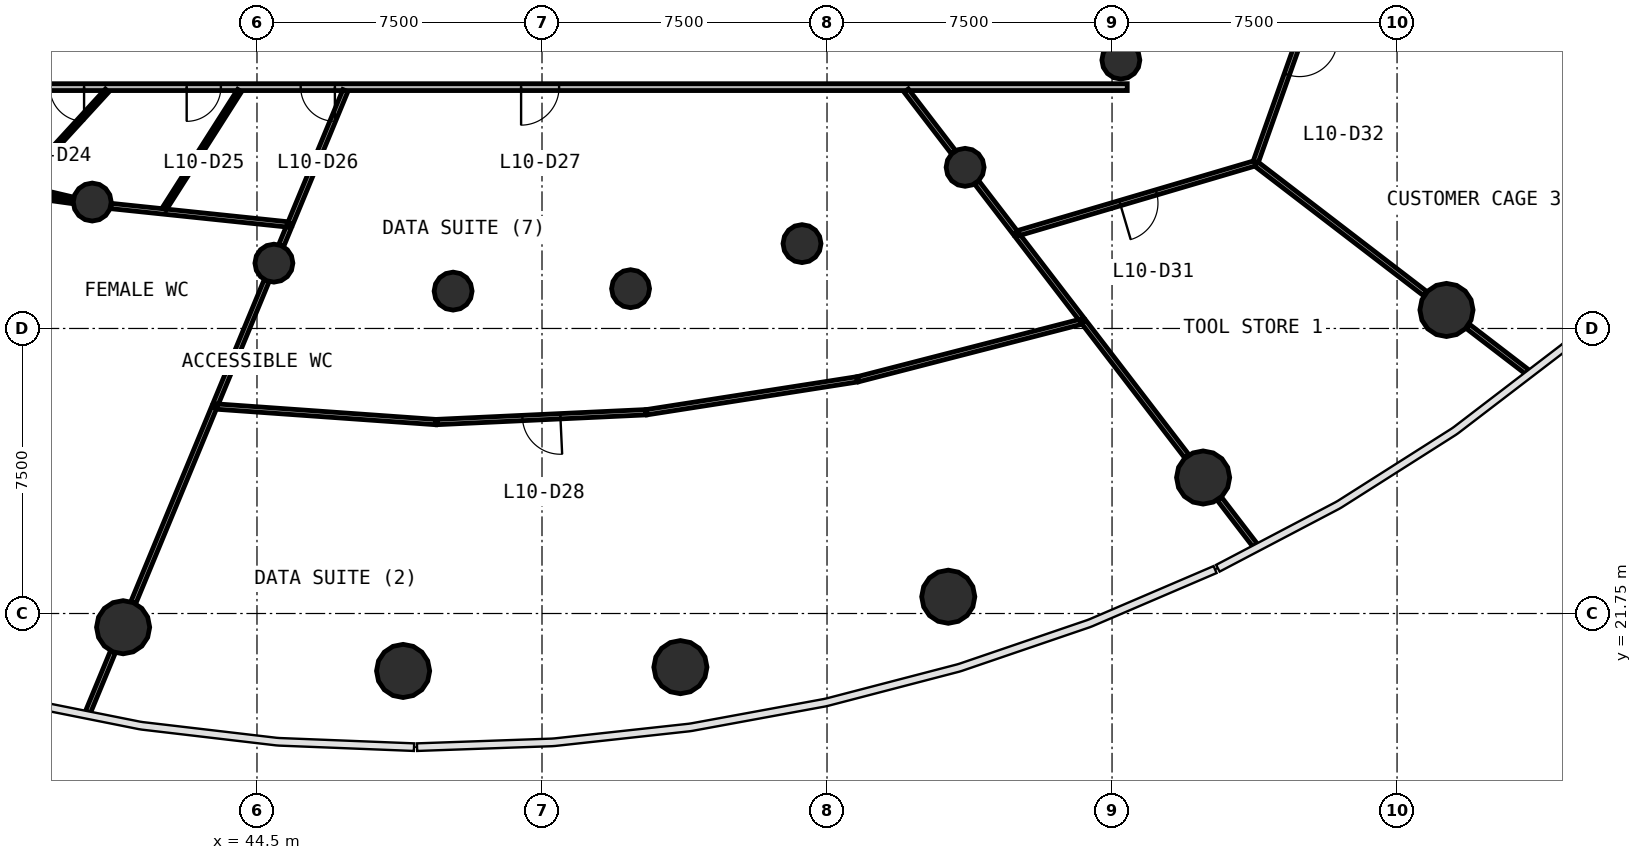
"""IFC4 building model, lengths in metres.
Left out: names, types, materials, properties, quantities, classifications, styles, units other than length and angle.
Written with IfcOpenShell. Run it as: python <this file> out.ifc"""

import sys

from ifc_helpers import new_model, si_unit, direction, frame, frame_2d, origin, origin_2d, place, context, subcontext, project, spatial, rectangle, circle, extrude, source, transform, mapped, element, fill, save


model = new_model("IFC4")
c1 = context("Model", 3, precision=1e-05, world=origin(), true_north=direction((0.0, 1.0)))
c2 = subcontext(c1, "Body", "Model", "MODEL_VIEW")
j1 = project(units=[si_unit("LENGTHUNIT", "METRE"), si_unit("PLANEANGLEUNIT", "RADIAN")], contexts=[c1])
p1 = place(None, origin())
s1 = spatial("IfcSite", under=j1, at=p1, CompositionType="ELEMENT")
p2 = place(p1, origin())
s2 = spatial("IfcBuilding", under=s1, at=p2, CompositionType="ELEMENT")
p3 = place(p2, frame((0.0, 0.0, 44.6)))
s3 = spatial("IfcBuildingStorey", under=s2, at=p3, CompositionType="ELEMENT", Elevation=44.6)
m1 = source(origin(), c2, "Body", "SweptSolid", [
    extrude(circle(Radius=0.7, at=origin_2d()), origin(), (0.0, 0.0, 1.0), 4.4),
])
for number, where, z_axis, x_axis in (
    (1, (40.977, 21.389, 0.0), (0.0, 0.0, 1.0), (1.0, 0.0, 0.0)),
    (2, (48.345, 20.239, 0.0), (0.0, 0.0, 1.0), (1.0, 0.0, 0.0)),
    (3, (55.642, 20.339, 0.0), (0.0, 0.0, 1.0), (1.0, 0.0, 0.0)),
    (4, (62.69, 22.191, 0.0), (0.0, 0.0, 1.0), (1.0, 0.0, 0.0)),
    (5, (69.396, 25.328, 0.0), (0.0, 0.0, 1.0), (1.0, 0.0, 0.0)),
    (6, (75.801, 29.737, 0.0), (0.0, 0.0, 1.0), (1.0, 0.0, 0.0)),
):
    element("IfcColumn", number, at=place(p3, frame(where, z_axis=z_axis, x_axis=x_axis)), inside=s3, PredefinedType="COLUMN", context=c2, shape_type="MappedRepresentation", body=[
        mapped(m1, transform((0.0, 0.0, 0.0), scale=1.0)),
    ])
m2 = source(origin(), c2, "Body", "SweptSolid", [
    extrude(circle(Radius=0.5, at=origin_2d()), origin(), (0.0, 0.0, 1.0), 4.4),
])
for number, where, z_axis, x_axis in (
    (7, (40.165, 32.576, 0.0), (0.0, 0.0, 1.0), (1.0, 0.0, 0.0)),
    (8, (44.945, 30.969, 0.0), (0.0, 0.0, 1.0), (1.0, 0.0, 0.0)),
    (9, (49.661, 30.233, 0.0), (0.0, 0.0, 1.0), (1.0, 0.0, 0.0)),
    (10, (54.331, 30.297, 0.0), (0.0, 0.0, 1.0), (1.0, 0.0, 0.0)),
    (11, (58.842, 31.482, 0.0), (0.0, 0.0, 1.0), (1.0, 0.0, 0.0)),
    (12, (63.134, 33.49, 0.0), (0.0, 0.0, 1.0), (1.0, 0.0, 0.0)),
    (13, (67.232, 36.312, 0.0), (0.0, 0.0, 1.0), (1.0, 0.0, 0.0)),
):
    element("IfcColumn", number, at=place(p3, frame(where, z_axis=z_axis, x_axis=x_axis)), inside=s3, PredefinedType="COLUMN", context=c2, shape_type="MappedRepresentation", body=[
        mapped(m2, transform((0.0, 0.0, 0.0), scale=1.0)),
    ])
p4 = place(p3, frame((67.4, 35.6, 0.0), z_axis=(0.0, 0.0, 1.0), x_axis=(-1.0, 0.0, 0.0)))
e14 = element("IfcWall", 14, at=p4, inside=s3, PredefinedType="PARTITIONING", context=c2, shape_type="SweptSolid", body=[
    extrude(rectangle(XDim=30.8, YDim=0.18, at=frame_2d((15.4, 0.0))), origin(), (0.0, 0.0, 1.0), 3.05),
])
p5 = place(p4, frame((27.45, 0.0, 0.0)))
e15 = element("IfcOpeningElement", 15, at=p5, cuts=e14, PredefinedType="OPENING", context=c2, shape_type="SweptSolid", body=[
    extrude(rectangle(XDim=0.9, YDim=2.1, at=frame_2d((0.45, 1.05))), frame((0.0, 0.1, 0.0), z_axis=(0.0, -1.0, 0.0), x_axis=(1.0, 0.0, 0.0)), (0.0, 0.0, 1.0), 0.2),
])
p6 = place(p4, frame((23.85, 0.0, 0.0)))
e16 = element("IfcOpeningElement", 16, at=p6, cuts=e14, PredefinedType="OPENING", context=c2, shape_type="SweptSolid", body=[
    extrude(rectangle(XDim=0.9, YDim=2.1, at=frame_2d((0.45, 1.05))), frame((0.0, 0.1, 0.0), z_axis=(0.0, -1.0, 0.0), x_axis=(1.0, 0.0, 0.0)), (0.0, 0.0, 1.0), 0.2),
])
p7 = place(p4, frame((20.85, 0.0, 0.0)))
e17 = element("IfcOpeningElement", 17, at=p7, cuts=e14, PredefinedType="OPENING", context=c2, shape_type="SweptSolid", body=[
    extrude(rectangle(XDim=0.9, YDim=2.1, at=frame_2d((0.45, 1.05))), frame((0.0, 0.1, 0.0), z_axis=(0.0, -1.0, 0.0), x_axis=(1.0, 0.0, 0.0)), (0.0, 0.0, 1.0), 0.2),
])
p8 = place(p4, frame((14.95, 0.0, 0.0)))
e18 = element("IfcOpeningElement", 18, at=p8, cuts=e14, PredefinedType="OPENING", context=c2, shape_type="SweptSolid", body=[
    extrude(rectangle(XDim=1.0, YDim=2.1, at=frame_2d((0.5, 1.05))), frame((0.0, 0.1, 0.0), z_axis=(0.0, -1.0, 0.0), x_axis=(1.0, 0.0, 0.0)), (0.0, 0.0, 1.0), 0.2),
])
p9 = place(p3, frame((72.821, 39.375, 0.0), z_axis=(0.0, 0.0, 1.0), x_axis=(0.923875203153, -0.382693884193, 0.0)))
e19 = element("IfcWall", 19, at=p9, inside=s3, PredefinedType="PARTITIONING", context=c2, shape_type="SweptSolid", body=[
    extrude(rectangle(XDim=8.845, YDim=0.14, at=frame_2d((4.423, 0.0))), origin(), (0.0, 0.0, 1.0), 3.05),
])
p10 = place(p3, frame((70.769, 33.598, 0.0), z_axis=(0.0, 0.0, 1.0), x_axis=(-0.959164410747, -0.282849134974, 0.0)))
e20 = element("IfcWall", 20, at=p10, inside=s3, PredefinedType="PARTITIONING", context=c2, shape_type="SweptSolid", body=[
    extrude(rectangle(XDim=6.562, YDim=0.14, at=frame_2d((3.281, 0.0))), origin(), (0.0, 0.0, 1.0), 3.05),
])
p11 = place(p10, frame((2.712, 0.0, 0.0)))
e21 = element("IfcOpeningElement", 21, at=p11, cuts=e20, PredefinedType="OPENING", context=c2, shape_type="SweptSolid", body=[
    extrude(rectangle(XDim=1.0, YDim=2.1, at=frame_2d((0.5, 1.05))), frame((0.0, 0.08, 0.0), z_axis=(0.0, -1.0, 0.0), x_axis=(1.0, 0.0, 0.0)), (0.0, 0.0, 1.0), 0.16),
])
p12 = place(p3, frame((72.798, 39.309, 0.0), z_axis=(0.0, 0.0, 1.0), x_axis=(-0.334820387554, -0.942281968456, 0.0)))
e22 = element("IfcWall", 22, at=p12, inside=s3, PredefinedType="PARTITIONING", context=c2, shape_type="SweptSolid", body=[
    extrude(rectangle(XDim=6.031, YDim=0.14, at=frame_2d((3.016, 0.0))), origin(), (0.0, 0.0, 1.0), 3.05),
])
p13 = place(p12, frame((2.581, 0.0, 0.0)))
e23 = element("IfcOpeningElement", 23, at=p13, cuts=e22, PredefinedType="OPENING", context=c2, shape_type="SweptSolid", body=[
    extrude(rectangle(XDim=1.0, YDim=2.1, at=frame_2d((0.5, 1.05))), frame((0.0, 0.08, 0.0), z_axis=(0.0, -1.0, 0.0), x_axis=(1.0, 0.0, 0.0)), (0.0, 0.0, 1.0), 0.16),
])
p14 = place(p3, frame((60.319, 27.916, 0.0), z_axis=(0.0, 0.0, 1.0), x_axis=(0.968340865999, 0.24963166313, 0.0)))
e24 = element("IfcWall", 24, at=p14, inside=s3, PredefinedType="PARTITIONING", context=c2, shape_type="SweptSolid", body=[
    extrude(rectangle(XDim=6.115, YDim=0.14, at=frame_2d((3.057, 0.0))), origin(), (0.0, 0.0, 1.0), 3.05),
])
p15 = place(p3, frame((33.805, 34.009, 0.0), z_axis=(0.0, 0.0, 1.0), x_axis=(0.973632222489, -0.22812342127, 0.0)))
e25 = element("IfcWall", 25, at=p15, inside=s3, PredefinedType="PARTITIONING", context=c2, shape_type="SweptSolid", body=[
    extrude(rectangle(XDim=6.018, YDim=0.14, at=frame_2d((3.009, 0.0))), origin(), (0.0, 0.0, 1.0), 3.05),
])
p16 = place(p3, frame((43.384, 27.199, 0.0), z_axis=(0.0, 0.0, 1.0), x_axis=(0.997508340925, -0.070548634182, 0.0)))
e26 = element("IfcWall", 26, at=p16, inside=s3, PredefinedType="PARTITIONING", context=c2, shape_type="SweptSolid", body=[
    extrude(rectangle(XDim=5.838, YDim=0.14, at=frame_2d((2.919, 0.0))), origin(), (0.0, 0.0, 1.0), 3.05),
])
p17 = place(p3, frame((70.793, 33.58, 0.0), z_axis=(0.0, 0.0, 1.0), x_axis=(0.793369467151, -0.6087404115, 0.0)))
e27 = element("IfcWall", 27, at=p17, inside=s3, PredefinedType="PARTITIONING", context=c2, shape_type="SweptSolid", body=[
    extrude(rectangle(XDim=5.608, YDim=0.14, at=frame_2d((2.804, 0.0))), origin(), (0.0, 0.0, 1.0), 3.05),
])
p18 = place(p3, frame((54.759, 27.047, 0.0), z_axis=(0.0, 0.0, 1.0), x_axis=(0.98802429514, 0.154298386943, 0.0)))
e28 = element("IfcWall", 28, at=p18, inside=s3, PredefinedType="PARTITIONING", context=c2, shape_type="SweptSolid", body=[
    extrude(rectangle(XDim=5.598, YDim=0.14, at=frame_2d((2.799, 0.0))), origin(), (0.0, 0.0, 1.0), 3.05),
])
p19 = place(p3, frame((43.373, 27.171, 0.0), z_axis=(0.0, 0.0, 1.0), x_axis=(-0.382670118501, -0.923885047182, 0.0)))
e29 = element("IfcWall", 29, at=p19, inside=s3, PredefinedType="PARTITIONING", context=c2, shape_type="SweptSolid", body=[
    extrude(rectangle(XDim=5.554, YDim=0.14, at=frame_2d((2.777, 0.0))), origin(), (0.0, 0.0, 1.0), 3.05),
])
p20 = place(p3, frame((54.729, 27.046, 0.0), z_axis=(0.0, 0.0, 1.0), x_axis=(-0.998905899041, -0.046765423781, 0.0)))
e30 = element("IfcWall", 30, at=p20, inside=s3, PredefinedType="PARTITIONING", context=c2, shape_type="SweptSolid", body=[
    extrude(rectangle(XDim=5.497, YDim=0.14, at=frame_2d((2.749, 0.0))), origin(), (0.0, 0.0, 1.0), 3.05),
])
p21 = place(p20, frame((2.247, 0.0, 0.0)))
e31 = element("IfcOpeningElement", 31, at=p21, cuts=e30, PredefinedType="OPENING", context=c2, shape_type="SweptSolid", body=[
    extrude(rectangle(XDim=1.0, YDim=2.1, at=frame_2d((0.5, 1.05))), frame((0.0, 0.08, 0.0), z_axis=(0.0, -1.0, 0.0), x_axis=(1.0, 0.0, 0.0)), (0.0, 0.0, 1.0), 0.16),
])
p22 = place(p3, frame((40.659, 32.472, 0.0), z_axis=(0.0, 0.0, 1.0), x_axis=(0.994613201527, -0.103656062762, 0.0)))
e32 = element("IfcWall", 32, at=p22, inside=s3, PredefinedType="PARTITIONING", context=c2, shape_type="SweptSolid", body=[
    extrude(rectangle(XDim=4.732, YDim=0.14, at=frame_2d((2.366, 0.0))), origin(), (0.0, 0.0, 1.0), 3.05),
])
p23 = place(p3, frame((66.258, 29.418, 0.0), z_axis=(0.0, 0.0, 1.0), x_axis=(0.608774632027, -0.793343209085, 0.0)))
e33 = element("IfcWall", 33, at=p23, inside=s3, PredefinedType="PARTITIONING", context=c2, shape_type="SweptSolid", body=[
    extrude(rectangle(XDim=4.451, YDim=0.14, at=frame_2d((2.226, 0.0))), origin(), (0.0, 0.0, 1.0), 3.05),
])
p24 = place(p3, frame((46.826, 35.51, 0.0), z_axis=(0.0, 0.0, 1.0), x_axis=(-0.382683759209, -0.923879397128, 0.0)))
e34 = element("IfcWall", 34, at=p24, inside=s3, PredefinedType="PARTITIONING", context=c2, shape_type="SweptSolid", body=[
    extrude(rectangle(XDim=3.789, YDim=0.14, at=frame_2d((1.895, 0.0))), origin(), (0.0, 0.0, 1.0), 3.05),
])
p25 = place(p3, frame((44.752, 30.502, 0.0), z_axis=(0.0, 0.0, 1.0), x_axis=(-0.382698672088, -0.923873219864, 0.0)))
e35 = element("IfcWall", 35, at=p25, inside=s3, PredefinedType="PARTITIONING", context=c2, shape_type="SweptSolid", body=[
    extrude(rectangle(XDim=3.502, YDim=0.14, at=frame_2d((1.751, 0.0))), origin(), (0.0, 0.0, 1.0), 3.05),
])
p26 = place(p3, frame((64.521, 31.683, 0.0), z_axis=(0.0, 0.0, 1.0), x_axis=(0.608761578312, -0.793353225727, 0.0)))
e36 = element("IfcWall", 36, at=p26, inside=s3, PredefinedType="PARTITIONING", context=c2, shape_type="SweptSolid", body=[
    extrude(rectangle(XDim=2.748, YDim=0.14, at=frame_2d((1.374, 0.0))), origin(), (0.0, 0.0, 1.0), 3.05),
])
p27 = place(p3, frame((61.584, 35.51, 0.0), z_axis=(0.0, 0.0, 1.0), x_axis=(0.608727763541, -0.793379171578, 0.0)))
e37 = element("IfcWall", 37, at=p27, inside=s3, PredefinedType="PARTITIONING", context=c2, shape_type="SweptSolid", body=[
    extrude(rectangle(XDim=2.042, YDim=0.14, at=frame_2d((1.021, 0.0))), origin(), (0.0, 0.0, 1.0), 3.05),
])
p28 = place(p3, frame((76.359, 29.309, 0.0), z_axis=(0.0, 0.0, 1.0), x_axis=(0.793312100237, -0.608815170325, 0.0)))
e38 = element("IfcWall", 38, at=p28, inside=s3, PredefinedType="PARTITIONING", context=c2, shape_type="SweptSolid", body=[
    extrude(rectangle(XDim=1.977, YDim=0.14, at=frame_2d((0.989, 0.0))), origin(), (0.0, 0.0, 1.0), 3.05),
])
p29 = place(p3, frame((40.708, 20.737, 0.0), z_axis=(0.0, 0.0, 1.0), x_axis=(-0.382632674553, -0.923900555452, 0.0)))
e39 = element("IfcWall", 39, at=p29, inside=s3, PredefinedType="PARTITIONING", context=c2, shape_type="SweptSolid", body=[
    extrude(rectangle(XDim=1.714, YDim=0.14, at=frame_2d((0.857, 0.0))), origin(), (0.0, 0.0, 1.0), 3.05),
])
p30 = place(p3, frame((63.441, 33.09, 0.0), z_axis=(0.0, 0.0, 1.0), x_axis=(0.608812360851, -0.793314256317, 0.0)))
e40 = element("IfcWall", 40, at=p30, inside=s3, PredefinedType="PARTITIONING", context=c2, shape_type="SweptSolid", body=[
    extrude(rectangle(XDim=1.669, YDim=0.14, at=frame_2d((0.834, 0.0))), origin(), (0.0, 0.0, 1.0), 3.05),
])
p31 = place(p3, frame((69.825, 24.77, 0.0), z_axis=(0.0, 0.0, 1.0), x_axis=(0.608816471317, -0.793311101809, 0.0)))
e41 = element("IfcWall", 41, at=p31, inside=s3, PredefinedType="PARTITIONING", context=c2, shape_type="SweptSolid", body=[
    extrude(rectangle(XDim=1.544, YDim=0.14, at=frame_2d((0.772, 0.0))), origin(), (0.0, 0.0, 1.0), 3.05),
])
p32 = place(p3, frame((45.337, 31.914, 0.0), z_axis=(0.0, 0.0, 1.0), x_axis=(-0.382809221062, -0.923827419094, 0.0)))
e42 = element("IfcWall", 42, at=p32, inside=s3, PredefinedType="PARTITIONING", context=c2, shape_type="SweptSolid", body=[
    extrude(rectangle(XDim=0.519, YDim=0.14, at=frame_2d((0.259, 0.0))), origin(), (0.0, 0.0, 1.0), 3.05),
])
p33 = place(p3, frame((44.043, 35.51, 0.0), z_axis=(0.0, 0.0, 1.0), x_axis=(-0.537273404115, -0.843408139177, 0.0)))
e43 = element("IfcWall", 43, at=p33, inside=s3, PredefinedType="PARTITIONING", context=c2, shape_type="SweptSolid", body=[
    extrude(rectangle(XDim=3.692, YDim=0.12, at=frame_2d((1.846, 0.0))), origin(), (0.0, 0.0, 1.0), 3.05),
])
p34 = place(p3, frame((40.555, 35.51, 0.0), z_axis=(0.0, 0.0, 1.0), x_axis=(-0.675566754316, -0.737298827114, 0.0)))
e44 = element("IfcWall", 44, at=p34, inside=s3, PredefinedType="PARTITIONING", context=c2, shape_type="SweptSolid", body=[
    extrude(rectangle(XDim=3.362, YDim=0.12, at=frame_2d((1.681, 0.0))), origin(), (0.0, 0.0, 1.0), 3.05),
])
p35 = place(p3, frame((38.112, 32.808, 0.0), z_axis=(0.0, 0.0, 1.0), x_axis=(0.990488726007, -0.137593908485, 0.0)))
e45 = element("IfcWall", 45, at=p35, inside=s3, PredefinedType="PARTITIONING", context=c2, shape_type="SweptSolid", body=[
    extrude(rectangle(XDim=1.563, YDim=0.12, at=frame_2d((0.782, 0.0))), origin(), (0.0, 0.0, 1.0), 3.05),
])
m3 = source(origin(), c2, "Body", "SweptSolid", [
    extrude(rectangle(XDim=0.9, YDim=2.1, at=frame_2d((0.45, 1.05))), frame((0.0, 0.025, 0.0), z_axis=(0.0, -1.0, 0.0), x_axis=(1.0, 0.0, 0.0)), (0.0, 0.0, 1.0), 0.05),
])
p36 = place(p5, origin())
e46 = element("IfcDoor", 46, at=p36, inside=s3, OperationType="SINGLE_SWING_LEFT", PredefinedType="DOOR", context=c2, shape_type="MappedRepresentation", body=[
    mapped(m3, transform((0.0, 0.0, 0.0), scale=1.0)),
])
fill(e15, e46)
p37 = place(p6, origin())
e47 = element("IfcDoor", 47, at=p37, inside=s3, OperationType="SINGLE_SWING_RIGHT", PredefinedType="DOOR", context=c2, shape_type="MappedRepresentation", body=[
    mapped(m3, transform((0.0, 0.0, 0.0), scale=1.0)),
])
fill(e16, e47)
p38 = place(p7, origin())
e48 = element("IfcDoor", 48, at=p38, inside=s3, OperationType="SINGLE_SWING_LEFT", PredefinedType="DOOR", context=c2, shape_type="MappedRepresentation", body=[
    mapped(m3, transform((0.0, 0.0, 0.0), scale=1.0)),
])
fill(e17, e48)
m4 = source(origin(), c2, "Body", "SweptSolid", [
    extrude(rectangle(XDim=1.0, YDim=2.1, at=frame_2d((0.5, 1.05))), frame((0.0, 0.025, 0.0), z_axis=(0.0, -1.0, 0.0), x_axis=(1.0, 0.0, 0.0)), (0.0, 0.0, 1.0), 0.05),
])
p39 = place(p8, origin())
e49 = element("IfcDoor", 49, at=p39, inside=s3, OperationType="SINGLE_SWING_RIGHT", PredefinedType="DOOR", context=c2, shape_type="MappedRepresentation", body=[
    mapped(m4, transform((0.0, 0.0, 0.0), scale=1.0)),
])
fill(e18, e49)
p40 = place(p21, origin())
e50 = element("IfcDoor", 50, at=p40, inside=s3, OperationType="SINGLE_SWING_LEFT", PredefinedType="DOOR", context=c2, shape_type="MappedRepresentation", body=[
    mapped(m4, transform((0.0, 0.0, 0.0), scale=1.0)),
])
fill(e31, e50)
p41 = place(p11, origin())
e51 = element("IfcDoor", 51, at=p41, inside=s3, OperationType="SINGLE_SWING_RIGHT", PredefinedType="DOOR", context=c2, shape_type="MappedRepresentation", body=[
    mapped(m4, transform((0.0, 0.0, 0.0), scale=1.0)),
])
fill(e21, e51)
p42 = place(p13, origin())
e52 = element("IfcDoor", 52, at=p42, inside=s3, OperationType="SINGLE_SWING_LEFT", PredefinedType="DOOR", context=c2, shape_type="MappedRepresentation", body=[
    mapped(m4, transform((0.0, 0.0, 0.0), scale=1.0)),
])
fill(e23, e52)
save(model, sys.argv[1])
